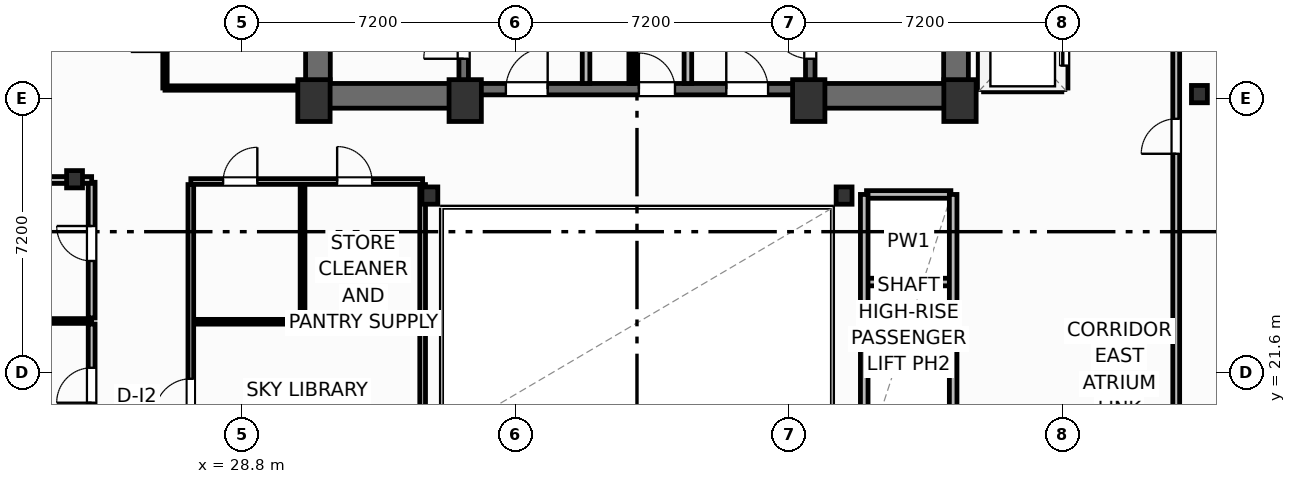
"""IFC4 building model, lengths in metres.
Left out: names, types, materials, properties, quantities, classifications, styles, units other than length and angle.
Written with IfcOpenShell. Run it as: python <this file> out.ifc"""

import sys

from ifc_helpers import new_model, si_unit, direction, frame, frame_2d, origin, origin_2d, place, context, subcontext, project, spatial, rectangle, i_section, extrude, element, fill, save


model = new_model("IFC4")
c1 = context("Model", 3, precision=1e-05, world=origin(), true_north=direction((0.0, 1.0)))
c2 = subcontext(c1, "Body", "Model", "MODEL_VIEW")
j1 = project(units=[si_unit("LENGTHUNIT", "METRE"), si_unit("PLANEANGLEUNIT", "RADIAN")], contexts=[c1])
p1 = place(None, origin())
s1 = spatial("IfcSite", under=j1, at=p1, CompositionType="ELEMENT")
p2 = place(p1, origin())
s2 = spatial("IfcBuilding", under=s1, at=p2, CompositionType="ELEMENT")
p3 = place(p2, frame((0.0, 0.0, 178.3)))
s3 = spatial("IfcBuildingStorey", under=s2, at=p3, CompositionType="ELEMENT", Elevation=178.3)
for number, where, z_axis, x_axis in (
    (1, (30.7, 28.75, 0.0), (0.0, 0.0, 1.0), (1.0, 0.0, 0.0)),
    (2, (34.68, 28.75, 0.0), (0.0, 0.0, 1.0), (1.0, 0.0, 0.0)),
    (3, (43.72, 28.75, 0.0), (0.0, 0.0, 1.0), (1.0, 0.0, 0.0)),
    (4, (47.7, 28.75, 0.0), (0.0, 0.0, 1.0), (1.0, 0.0, 0.0)),
):
    element("IfcColumn", number, at=place(p3, frame(where, z_axis=z_axis, x_axis=x_axis)), inside=s3, PredefinedType="COLUMN", context=c2, shape_type="SweptSolid", body=[
        extrude(rectangle(XDim=0.85, YDim=1.1, at=origin_2d()), origin(), (0.0, 0.0, 1.0), 3.7),
    ])
for number, where, z_axis, x_axis in (
    (5, (33.75, 26.25, 0.0), (0.0, 0.0, 1.0), (1.0, 0.0, 0.0)),
    (6, (44.65, 26.25, 0.0), (0.0, 0.0, 1.0), (1.0, 0.0, 0.0)),
    (7, (24.4, 26.68, 0.0), (0.0, 0.0, 1.0), (1.0, 0.0, 0.0)),
    (8, (54.0, 28.92, 0.0), (0.0, 0.0, 1.0), (1.0, 0.0, 0.0)),
):
    element("IfcColumn", number, at=place(p3, frame(where, z_axis=z_axis, x_axis=x_axis)), inside=s3, PredefinedType="COLUMN", context=c2, shape_type="SweptSolid", body=[
        extrude(i_section(OverallWidth=0.418, OverallDepth=0.455, WebThickness=0.042, FlangeThickness=0.068, FilletRadius=0.025, at=origin_2d()), origin(), (0.0, 0.0, 1.0), 3.7),
    ])
for number, where, z_axis, x_axis in (
    (9, (30.805, 29.2, 0.0), (0.0, 0.0, 1.0), (0.0, 1.0, 0.0)),
    (10, (47.595, 29.2, 0.0), (0.0, 0.0, 1.0), (0.0, 1.0, 0.0)),
):
    element("IfcWall", number, at=place(p3, frame(where, z_axis=z_axis, x_axis=x_axis)), inside=s3, PredefinedType="SHEAR", context=c2, shape_type="SweptSolid", body=[
        extrude(rectangle(XDim=9.22, YDim=0.65, at=frame_2d((4.61, 0.0))), origin(), (0.0, 0.0, 1.0), 3.45),
    ])
p4 = place(p3, frame((30.48, 28.875, 0.0), z_axis=(0.0, 0.0, 1.0), x_axis=(1.0, 0.0, 0.0)))
e11 = element("IfcWall", 11, at=p4, inside=s3, PredefinedType="SHEAR", context=c2, shape_type="SweptSolid", body=[
    extrude(rectangle(XDim=4.32, YDim=0.65, at=frame_2d((2.16, 0.0))), origin(), (0.0, 0.0, 1.0), 3.45),
])
p5 = place(p3, frame((43.6, 28.875, 0.0), z_axis=(0.0, 0.0, 1.0), x_axis=(1.0, 0.0, 0.0)))
e12 = element("IfcWall", 12, at=p5, inside=s3, PredefinedType="SHEAR", context=c2, shape_type="SweptSolid", body=[
    extrude(rectangle(XDim=4.32, YDim=0.65, at=frame_2d((2.16, 0.0))), origin(), (0.0, 0.0, 1.0), 3.45),
])
p6 = place(p3, frame((34.8, 29.05, 0.0), z_axis=(0.0, 0.0, 1.0), x_axis=(1.0, 0.0, 0.0)))
e13 = element("IfcWall", 13, at=p6, inside=s3, PredefinedType="SHEAR", context=c2, shape_type="SweptSolid", body=[
    extrude(rectangle(XDim=8.8, YDim=0.3, at=frame_2d((4.4, 0.0))), origin(), (0.0, 0.0, 1.0), 3.45),
])
p7 = place(p6, frame((0.95, 0.0, 0.0)))
e14 = element("IfcOpeningElement", 14, at=p7, cuts=e13, PredefinedType="OPENING", context=c2, shape_type="SweptSolid", body=[
    extrude(rectangle(XDim=1.1, YDim=2.15, at=frame_2d((0.55, 1.075))), frame((0.0, 0.16, 0.0), z_axis=(0.0, -1.0, 0.0), x_axis=(1.0, 0.0, 0.0)), (0.0, 0.0, 1.0), 0.32),
])
p8 = place(p6, frame((6.75, 0.0, 0.0)))
e15 = element("IfcOpeningElement", 15, at=p8, cuts=e13, PredefinedType="OPENING", context=c2, shape_type="SweptSolid", body=[
    extrude(rectangle(XDim=1.1, YDim=2.15, at=frame_2d((0.55, 1.075))), frame((0.0, 0.16, 0.0), z_axis=(0.0, -1.0, 0.0), x_axis=(1.0, 0.0, 0.0)), (0.0, 0.0, 1.0), 0.32),
])
p9 = place(p6, frame((4.45, 0.0, 0.0)))
e16 = element("IfcOpeningElement", 16, at=p9, cuts=e13, PredefinedType="OPENING", context=c2, shape_type="SweptSolid", body=[
    extrude(rectangle(XDim=0.95, YDim=2.15, at=frame_2d((0.475, 1.075))), frame((0.0, 0.16, 0.0), z_axis=(0.0, -1.0, 0.0), x_axis=(1.0, 0.0, 0.0)), (0.0, 0.0, 1.0), 0.32),
])
p10 = place(p3, frame((34.64, 29.2, 0.0), z_axis=(0.0, 0.0, 1.0), x_axis=(0.0, 1.0, 0.0)))
e17 = element("IfcWall", 17, at=p10, inside=s3, PredefinedType="SHEAR", context=c2, shape_type="SweptSolid", body=[
    extrude(rectangle(XDim=9.22, YDim=0.25, at=frame_2d((4.61, 0.0))), origin(), (0.0, 0.0, 1.0), 3.45),
])
p11 = place(p10, frame((0.65, 0.0, 0.0)))
e18 = element("IfcOpeningElement", 18, at=p11, cuts=e17, PredefinedType="OPENING", context=c2, shape_type="SweptSolid", body=[
    extrude(rectangle(XDim=1.05, YDim=2.15, at=frame_2d((0.525, 1.075))), frame((0.0, 0.135, 0.0), z_axis=(0.0, -1.0, 0.0), x_axis=(1.0, 0.0, 0.0)), (0.0, 0.0, 1.0), 0.27),
])
p12 = place(p3, frame((43.76, 29.2, 0.0), z_axis=(0.0, 0.0, 1.0), x_axis=(0.0, 1.0, 0.0)))
e19 = element("IfcWall", 19, at=p12, inside=s3, PredefinedType="SHEAR", context=c2, shape_type="SweptSolid", body=[
    extrude(rectangle(XDim=9.22, YDim=0.25, at=frame_2d((4.61, 0.0))), origin(), (0.0, 0.0, 1.0), 3.45),
])
p13 = place(p12, frame((0.65, 0.0, 0.0)))
e20 = element("IfcOpeningElement", 20, at=p13, cuts=e19, PredefinedType="OPENING", context=c2, shape_type="SweptSolid", body=[
    extrude(rectangle(XDim=1.05, YDim=2.15, at=frame_2d((0.525, 1.075))), frame((0.0, 0.135, 0.0), z_axis=(0.0, -1.0, 0.0), x_axis=(1.0, 0.0, 0.0)), (0.0, 0.0, 1.0), 0.27),
])
p14 = place(p3, frame((24.85, 19.3, 0.0), z_axis=(0.0, 0.0, 1.0), x_axis=(0.0, 1.0, 0.0)))
e21 = element("IfcWall", 21, at=p14, inside=s3, PredefinedType="PARTITIONING", context=c2, shape_type="SweptSolid", body=[
    extrude(rectangle(XDim=3.57, YDim=0.18, at=frame_2d((1.785, 0.0))), origin(), (0.0, 0.0, 1.0), 3.45),
])
p15 = place(p14, frame((1.5, 0.0, 0.0)))
e22 = element("IfcOpeningElement", 22, at=p15, cuts=e21, PredefinedType="OPENING", context=c2, shape_type="SweptSolid", body=[
    extrude(rectangle(XDim=0.92, YDim=2.05, at=frame_2d((0.46, 1.025))), frame((0.0, 0.1, 0.0), z_axis=(0.0, -1.0, 0.0), x_axis=(1.0, 0.0, 0.0)), (0.0, 0.0, 1.0), 0.2),
])
p16 = place(p3, frame((24.85, 23.03, 0.0), z_axis=(0.0, 0.0, 1.0), x_axis=(0.0, 1.0, 0.0)))
e23 = element("IfcWall", 23, at=p16, inside=s3, PredefinedType="PARTITIONING", context=c2, shape_type="SweptSolid", body=[
    extrude(rectangle(XDim=3.57, YDim=0.18, at=frame_2d((1.785, 0.0))), origin(), (0.0, 0.0, 1.0), 3.45),
])
p17 = place(p16, frame((1.5, 0.0, 0.0)))
e24 = element("IfcOpeningElement", 24, at=p17, cuts=e23, PredefinedType="OPENING", context=c2, shape_type="SweptSolid", body=[
    extrude(rectangle(XDim=0.92, YDim=2.05, at=frame_2d((0.46, 1.025))), frame((0.0, 0.1, 0.0), z_axis=(0.0, -1.0, 0.0), x_axis=(1.0, 0.0, 0.0)), (0.0, 0.0, 1.0), 0.2),
])
p18 = place(p3, frame((4.107, 22.95, 0.0), z_axis=(0.0, 0.0, 1.0), x_axis=(1.0, 0.0, 0.0)))
e25 = element("IfcWall", 25, at=p18, inside=s3, PredefinedType="PARTITIONING", context=c2, shape_type="SweptSolid", body=[
    extrude(rectangle(XDim=20.743, YDim=0.125, at=frame_2d((10.371, 0.0))), origin(), (0.0, 0.0, 1.0), 2.662),
])
p19 = place(p3, frame((3.658, 26.66, 0.0), z_axis=(0.0, 0.0, 1.0), x_axis=(1.0, 0.0, 0.0)))
e26 = element("IfcWall", 26, at=p19, inside=s3, PredefinedType="PARTITIONING", context=c2, shape_type="SweptSolid", body=[
    extrude(rectangle(XDim=21.192, YDim=0.18, at=frame_2d((10.596, 0.0))), origin(), (0.0, 0.0, 1.0), 2.662),
])
p20 = place(p3, frame((53.39, 19.28, 0.0), z_axis=(0.0, 0.0, 1.0), x_axis=(0.0, 1.0, 0.0)))
e27 = element("IfcWall", 27, at=p20, inside=s3, PredefinedType="PARTITIONING", context=c2, shape_type="SweptSolid", body=[
    extrude(rectangle(XDim=20.02, YDim=0.18, at=frame_2d((10.01, 0.0))), origin(), (0.0, 0.0, 1.0), 3.45),
])
p21 = place(p20, frame((8.07, 0.0, 0.0)))
e28 = element("IfcOpeningElement", 28, at=p21, cuts=e27, PredefinedType="OPENING", context=c2, shape_type="SweptSolid", body=[
    extrude(rectangle(XDim=0.92, YDim=2.05, at=frame_2d((0.46, 1.025))), frame((0.0, 0.1, 0.0), z_axis=(0.0, -1.0, 0.0), x_axis=(1.0, 0.0, 0.0)), (0.0, 0.0, 1.0), 0.2),
])
for number, where, z_axis, x_axis in (
    (29, (37.86, 29.2, 0.0), (0.0, 0.0, 1.0), (0.0, 1.0, 0.0)),
    (30, (40.54, 29.2, 0.0), (0.0, 0.0, 1.0), (0.0, 1.0, 0.0)),
):
    element("IfcWall", number, at=place(p3, frame(where, z_axis=z_axis, x_axis=x_axis)), inside=s3, PredefinedType="PARTITIONING", context=c2, shape_type="SweptSolid", body=[
        extrude(rectangle(XDim=5.18, YDim=0.2, at=frame_2d((2.59, 0.0))), origin(), (0.0, 0.0, 1.0), 3.45),
    ])
p22 = place(p3, frame((39.05, 29.2, 0.0), z_axis=(0.0, 0.0, 1.0), x_axis=(0.0, 1.0, 0.0)))
e31 = element("IfcWall", 31, at=p22, inside=s3, PredefinedType="PARTITIONING", context=c2, shape_type="SweptSolid", body=[
    extrude(rectangle(XDim=5.22, YDim=0.125, at=frame_2d((2.61, 0.0))), origin(), (0.0, 0.0, 1.0), 3.45),
])
p23 = place(p22, frame((2.05, 0.0, 0.0)))
e32 = element("IfcOpeningElement", 32, at=p23, cuts=e31, PredefinedType="OPENING", context=c2, shape_type="SweptSolid", body=[
    extrude(rectangle(XDim=0.85, YDim=2.05, at=frame_2d((0.425, 1.025))), frame((0.0, 0.073, 0.0), z_axis=(0.0, -1.0, 0.0), x_axis=(1.0, 0.0, 0.0)), (0.0, 0.0, 1.0), 0.145),
])
p24 = place(p3, frame((27.46, 26.62, 0.0), z_axis=(0.0, 0.0, 1.0), x_axis=(1.0, 0.0, 0.0)))
e33 = element("IfcWall", 33, at=p24, inside=s3, PredefinedType="PARTITIONING", context=c2, shape_type="SweptSolid", body=[
    extrude(rectangle(XDim=6.1, YDim=0.15, at=frame_2d((3.05, 0.0))), origin(), (0.0, 0.0, 1.0), 2.662),
])
p25 = place(p24, frame((0.85, 0.0, 0.0)))
e34 = element("IfcOpeningElement", 34, at=p25, cuts=e33, PredefinedType="OPENING", context=c2, shape_type="SweptSolid", body=[
    extrude(rectangle(XDim=0.9, YDim=2.05, at=frame_2d((0.45, 1.025))), frame((0.0, 0.085, 0.0), z_axis=(0.0, -1.0, 0.0), x_axis=(1.0, 0.0, 0.0)), (0.0, 0.0, 1.0), 0.17),
])
p26 = place(p24, frame((3.85, 0.0, 0.0)))
e35 = element("IfcOpeningElement", 35, at=p26, cuts=e33, PredefinedType="OPENING", context=c2, shape_type="SweptSolid", body=[
    extrude(rectangle(XDim=0.92, YDim=2.05, at=frame_2d((0.46, 1.025))), frame((0.0, 0.085, 0.0), z_axis=(0.0, -1.0, 0.0), x_axis=(1.0, 0.0, 0.0)), (0.0, 0.0, 1.0), 0.17),
])
p27 = place(p3, frame((27.52, 22.93, 0.0), z_axis=(0.0, 0.0, 1.0), x_axis=(1.0, 0.0, 0.0)))
e36 = element("IfcWall", 36, at=p27, inside=s3, PredefinedType="PARTITIONING", context=c2, shape_type="SweptSolid", body=[
    extrude(rectangle(XDim=6.0, YDim=0.125, at=frame_2d((3.0, 0.0))), origin(), (0.0, 0.0, 1.0), 3.45),
])
p28 = place(p3, frame((30.4, 23.0, 0.0), z_axis=(0.0, 0.0, 1.0), x_axis=(0.0, 1.0, 0.0)))
e37 = element("IfcWall", 37, at=p28, inside=s3, PredefinedType="PARTITIONING", context=c2, shape_type="SweptSolid", body=[
    extrude(rectangle(XDim=3.54, YDim=0.125, at=frame_2d((1.77, 0.0))), origin(), (0.0, 0.0, 1.0), 3.45),
])
p29 = place(p3, frame((27.46, 19.38, 0.0), z_axis=(0.0, 0.0, 1.0), x_axis=(0.0, 1.0, 0.0)))
e38 = element("IfcWall", 38, at=p29, inside=s3, PredefinedType="PARTITIONING", context=c2, shape_type="SweptSolid", body=[
    extrude(rectangle(XDim=7.16, YDim=0.15, at=frame_2d((3.58, 0.0))), origin(), (0.0, 0.0, 1.0), 3.45),
])
p30 = place(p29, frame((1.1, 0.0, 0.0)))
e39 = element("IfcOpeningElement", 39, at=p30, cuts=e38, PredefinedType="OPENING", context=c2, shape_type="SweptSolid", body=[
    extrude(rectangle(XDim=0.95, YDim=2.05, at=frame_2d((0.475, 1.025))), frame((0.0, 0.085, 0.0), z_axis=(0.0, -1.0, 0.0), x_axis=(1.0, 0.0, 0.0)), (0.0, 0.0, 1.0), 0.17),
])
p31 = place(p3, frame((33.56, 19.38, 0.0), z_axis=(0.0, 0.0, 1.0), x_axis=(0.0, 1.0, 0.0)))
e40 = element("IfcWall", 40, at=p31, inside=s3, PredefinedType="PARTITIONING", context=c2, shape_type="SweptSolid", body=[
    extrude(rectangle(XDim=7.16, YDim=0.15, at=frame_2d((3.58, 0.0))), origin(), (0.0, 0.0, 1.0), 2.824),
])
p32 = place(p3, frame((26.78, 29.08, 0.0), z_axis=(0.0, 0.0, 1.0), x_axis=(1.0, 0.0, 0.0)))
e41 = element("IfcWall", 41, at=p32, inside=s3, PredefinedType="PARTITIONING", context=c2, shape_type="SweptSolid", body=[
    extrude(rectangle(XDim=3.7, YDim=0.115, at=frame_2d((1.85, 0.0))), origin(), (0.0, 0.0, 1.0), 3.45),
])
p33 = place(p3, frame((26.78, 29.08, 0.0), z_axis=(0.0, 0.0, 1.0), x_axis=(0.0, 1.0, 0.0)))
e42 = element("IfcWall", 42, at=p33, inside=s3, PredefinedType="PARTITIONING", context=c2, shape_type="SweptSolid", body=[
    extrude(rectangle(XDim=3.11, YDim=0.115, at=frame_2d((1.555, 0.0))), origin(), (0.0, 0.0, 1.0), 3.45),
])
p34 = place(p33, frame((0.95, 0.0, 0.0)))
e43 = element("IfcOpeningElement", 43, at=p34, cuts=e42, PredefinedType="OPENING", context=c2, shape_type="SweptSolid", body=[
    extrude(rectangle(XDim=0.9, YDim=2.05, at=frame_2d((0.45, 1.025))), frame((0.0, 0.067, 0.0), z_axis=(0.0, -1.0, 0.0), x_axis=(1.0, 0.0, 0.0)), (0.0, 0.0, 1.0), 0.135),
])
p35 = place(p3, frame((48.32, 29.08, 0.0), z_axis=(0.0, 0.0, 1.0), x_axis=(1.0, 0.0, 0.0)))
e44 = element("IfcWall", 44, at=p35, inside=s3, PredefinedType="PARTITIONING", context=c2, shape_type="SweptSolid", body=[
    extrude(rectangle(XDim=2.06, YDim=0.2, at=frame_2d((1.03, 0.0))), origin(), (0.0, 0.0, 1.0), 2.662),
])
p36 = place(p3, frame((48.28, 29.08, 0.0), z_axis=(0.0, 0.0, 1.0), x_axis=(0.0, 1.0, 0.0)))
e45 = element("IfcWall", 45, at=p36, inside=s3, PredefinedType="PARTITIONING", context=c2, shape_type="SweptSolid", body=[
    extrude(rectangle(XDim=6.89, YDim=0.2, at=frame_2d((3.445, 0.0))), origin(), (0.0, 0.0, 1.0), 3.45),
])
p37 = place(p3, frame((50.44, 29.08, 0.0), z_axis=(0.0, 0.0, 1.0), x_axis=(0.0, 1.0, 0.0)))
e46 = element("IfcWall", 46, at=p37, inside=s3, PredefinedType="PARTITIONING", context=c2, shape_type="SweptSolid", body=[
    extrude(rectangle(XDim=6.89, YDim=0.2, at=frame_2d((3.445, 0.0))), origin(), (0.0, 0.0, 1.0), 3.45),
])
p38 = place(p37, frame((0.59, 0.0, 0.0)))
e47 = element("IfcOpeningElement", 47, at=p38, cuts=e46, PredefinedType="OPENING", context=c2, shape_type="SweptSolid", body=[
    extrude(rectangle(XDim=1.1, YDim=2.15, at=frame_2d((0.55, 1.075))), frame((0.0, 0.11, 0.0), z_axis=(0.0, -1.0, 0.0), x_axis=(1.0, 0.0, 0.0)), (0.0, 0.0, 1.0), 0.22),
])
p39 = place(p37, frame((2.89, 0.0, 0.0)))
e48 = element("IfcOpeningElement", 48, at=p39, cuts=e46, PredefinedType="OPENING", context=c2, shape_type="SweptSolid", body=[
    extrude(rectangle(XDim=1.1, YDim=2.15, at=frame_2d((0.55, 1.075))), frame((0.0, 0.11, 0.0), z_axis=(0.0, -1.0, 0.0), x_axis=(1.0, 0.0, 0.0)), (0.0, 0.0, 1.0), 0.22),
])
p40 = place(p37, frame((5.19, 0.0, 0.0)))
e49 = element("IfcOpeningElement", 49, at=p40, cuts=e46, PredefinedType="OPENING", context=c2, shape_type="SweptSolid", body=[
    extrude(rectangle(XDim=1.1, YDim=2.15, at=frame_2d((0.55, 1.075))), frame((0.0, 0.11, 0.0), z_axis=(0.0, -1.0, 0.0), x_axis=(1.0, 0.0, 0.0)), (0.0, 0.0, 1.0), 0.22),
])
for number, where, z_axis, x_axis in (
    (50, (45.24, 21.675, 0.0), (0.0, 0.0, 1.0), (1.0, 0.0, 0.0)),
    (51, (45.24, 23.975, 0.0), (0.0, 0.0, 1.0), (1.0, 0.0, 0.0)),
    (52, (45.24, 26.28, 0.0), (0.0, 0.0, 1.0), (1.0, 0.0, 0.0)),
):
    element("IfcWall", number, at=place(p3, frame(where, z_axis=z_axis, x_axis=x_axis)), inside=s3, PredefinedType="PARTITIONING", context=c2, shape_type="SweptSolid", body=[
        extrude(rectangle(XDim=2.22, YDim=0.2, at=frame_2d((1.11, 0.0))), origin(), (0.0, 0.0, 1.0), 3.45),
    ])
for number, where, z_axis, x_axis in (
    (53, (45.18, 19.38, 0.0), (0.0, 0.0, 1.0), (0.0, 1.0, 0.0)),
    (54, (47.52, 19.38, 0.0), (0.0, 0.0, 1.0), (0.0, 1.0, 0.0)),
):
    element("IfcWall", number, at=place(p3, frame(where, z_axis=z_axis, x_axis=x_axis)), inside=s3, PredefinedType="PARTITIONING", context=c2, shape_type="SweptSolid", body=[
        extrude(rectangle(XDim=6.9, YDim=0.2, at=frame_2d((3.45, 0.0))), origin(), (0.0, 0.0, 1.0), 3.45),
    ])
p41 = place(p15, origin())
e55 = element("IfcDoor", 55, at=p41, inside=s3, OperationType="SINGLE_SWING_LEFT", PredefinedType="DOOR", context=c2, shape_type="SweptSolid", body=[
    extrude(rectangle(XDim=0.92, YDim=2.05, at=frame_2d((0.46, 1.025))), frame((0.0, 0.025, 0.0), z_axis=(0.0, -1.0, 0.0), x_axis=(1.0, 0.0, 0.0)), (0.0, 0.0, 1.0), 0.05),
])
fill(e22, e55)
p42 = place(p17, origin())
e56 = element("IfcDoor", 56, at=p42, inside=s3, OperationType="SINGLE_SWING_RIGHT", PredefinedType="DOOR", context=c2, shape_type="SweptSolid", body=[
    extrude(rectangle(XDim=0.92, YDim=2.05, at=frame_2d((0.46, 1.025))), frame((0.0, 0.025, 0.0), z_axis=(0.0, -1.0, 0.0), x_axis=(1.0, 0.0, 0.0)), (0.0, 0.0, 1.0), 0.05),
])
fill(e24, e56)
p43 = place(p21, origin())
e57 = element("IfcDoor", 57, at=p43, inside=s3, OperationType="SINGLE_SWING_LEFT", PredefinedType="DOOR", context=c2, shape_type="SweptSolid", body=[
    extrude(rectangle(XDim=0.92, YDim=2.05, at=frame_2d((0.46, 1.025))), frame((0.0, 0.025, 0.0), z_axis=(0.0, -1.0, 0.0), x_axis=(1.0, 0.0, 0.0)), (0.0, 0.0, 1.0), 0.05),
])
fill(e28, e57)
p44 = place(p11, origin())
e58 = element("IfcDoor", 58, at=p44, inside=s3, OperationType="SINGLE_SWING_LEFT", PredefinedType="DOOR", context=c2, shape_type="SweptSolid", body=[
    extrude(rectangle(XDim=1.05, YDim=2.15, at=frame_2d((0.525, 1.075))), frame((0.0, 0.025, 0.0), z_axis=(0.0, -1.0, 0.0), x_axis=(1.0, 0.0, 0.0)), (0.0, 0.0, 1.0), 0.05),
])
fill(e18, e58)
p45 = place(p13, origin())
e59 = element("IfcDoor", 59, at=p45, inside=s3, OperationType="SINGLE_SWING_RIGHT", PredefinedType="DOOR", context=c2, shape_type="SweptSolid", body=[
    extrude(rectangle(XDim=1.05, YDim=2.15, at=frame_2d((0.525, 1.075))), frame((0.0, 0.025, 0.0), z_axis=(0.0, -1.0, 0.0), x_axis=(1.0, 0.0, 0.0)), (0.0, 0.0, 1.0), 0.05),
])
fill(e20, e59)
p46 = place(p7, origin())
e60 = element("IfcDoor", 60, at=p46, inside=s3, OperationType="SINGLE_SWING_RIGHT", PredefinedType="DOOR", context=c2, shape_type="SweptSolid", body=[
    extrude(rectangle(XDim=1.1, YDim=2.15, at=frame_2d((0.55, 1.075))), frame((0.0, 0.025, 0.0), z_axis=(0.0, -1.0, 0.0), x_axis=(1.0, 0.0, 0.0)), (0.0, 0.0, 1.0), 0.05),
])
fill(e14, e60)
p47 = place(p8, origin())
e61 = element("IfcDoor", 61, at=p47, inside=s3, OperationType="SINGLE_SWING_LEFT", PredefinedType="DOOR", context=c2, shape_type="SweptSolid", body=[
    extrude(rectangle(XDim=1.1, YDim=2.15, at=frame_2d((0.55, 1.075))), frame((0.0, 0.025, 0.0), z_axis=(0.0, -1.0, 0.0), x_axis=(1.0, 0.0, 0.0)), (0.0, 0.0, 1.0), 0.05),
])
fill(e15, e61)
p48 = place(p9, origin())
e62 = element("IfcDoor", 62, at=p48, inside=s3, OperationType="SINGLE_SWING_LEFT", PredefinedType="DOOR", context=c2, shape_type="SweptSolid", body=[
    extrude(rectangle(XDim=0.95, YDim=2.15, at=frame_2d((0.475, 1.075))), frame((0.0, 0.025, 0.0), z_axis=(0.0, -1.0, 0.0), x_axis=(1.0, 0.0, 0.0)), (0.0, 0.0, 1.0), 0.05),
])
fill(e16, e62)
p49 = place(p25, origin())
e63 = element("IfcDoor", 63, at=p49, inside=s3, OperationType="SINGLE_SWING_RIGHT", PredefinedType="DOOR", context=c2, shape_type="SweptSolid", body=[
    extrude(rectangle(XDim=0.9, YDim=2.05, at=frame_2d((0.45, 1.025))), frame((0.0, 0.025, 0.0), z_axis=(0.0, -1.0, 0.0), x_axis=(1.0, 0.0, 0.0)), (0.0, 0.0, 1.0), 0.05),
])
fill(e34, e63)
p50 = place(p26, origin())
e64 = element("IfcDoor", 64, at=p50, inside=s3, OperationType="SINGLE_SWING_LEFT", PredefinedType="DOOR", context=c2, shape_type="SweptSolid", body=[
    extrude(rectangle(XDim=0.92, YDim=2.05, at=frame_2d((0.46, 1.025))), frame((0.0, 0.025, 0.0), z_axis=(0.0, -1.0, 0.0), x_axis=(1.0, 0.0, 0.0)), (0.0, 0.0, 1.0), 0.05),
])
fill(e35, e64)
p51 = place(p30, origin())
e65 = element("IfcDoor", 65, at=p51, inside=s3, OperationType="SINGLE_SWING_LEFT", PredefinedType="DOOR", context=c2, shape_type="SweptSolid", body=[
    extrude(rectangle(XDim=0.95, YDim=2.05, at=frame_2d((0.475, 1.025))), frame((0.0, 0.025, 0.0), z_axis=(0.0, -1.0, 0.0), x_axis=(1.0, 0.0, 0.0)), (0.0, 0.0, 1.0), 0.05),
])
fill(e39, e65)
p52 = place(p38, origin())
e66 = element("IfcDoor", 66, at=p52, inside=s3, OperationType="SLIDING_TO_LEFT", PredefinedType="DOOR", context=c2, shape_type="SweptSolid", body=[
    extrude(rectangle(XDim=1.1, YDim=2.15, at=frame_2d((0.55, 1.075))), frame((0.0, 0.025, 0.0), z_axis=(0.0, -1.0, 0.0), x_axis=(1.0, 0.0, 0.0)), (0.0, 0.0, 1.0), 0.05),
])
fill(e47, e66)
save(model, sys.argv[1])
